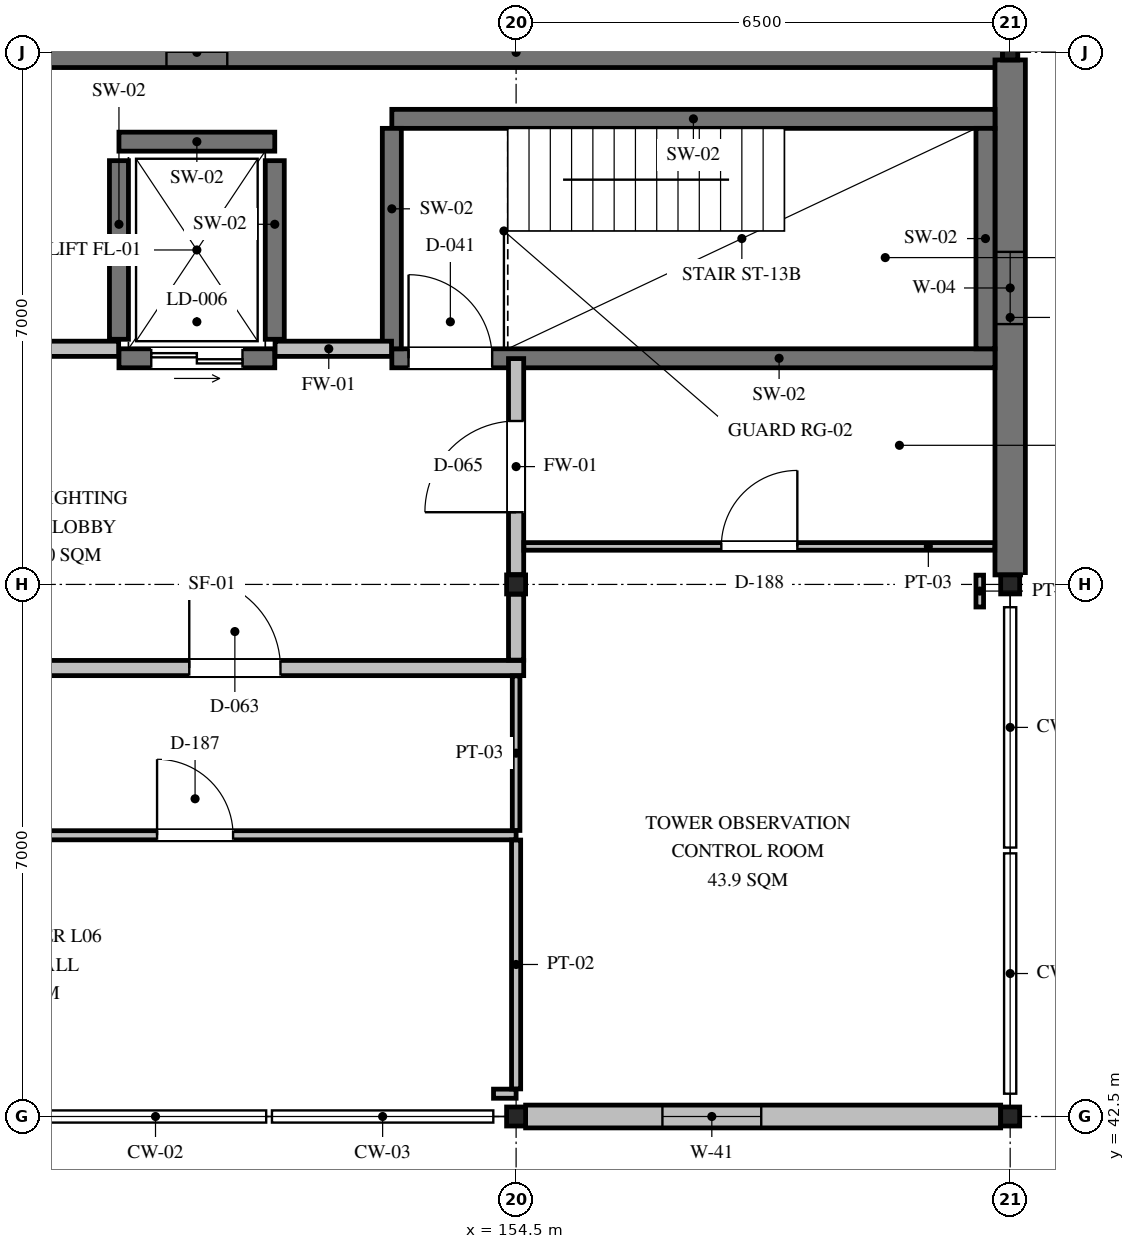
"""IFC4 building model, lengths in metres.
Left out: names, types, materials, properties, quantities, classifications, styles, units other than length and angle.
Written with IfcOpenShell. Run it as: python <this file> out.ifc"""

import sys

from ifc_helpers import new_model, si_unit, direction, frame, frame_2d, origin, origin_2d, place, context, subcontext, project, spatial, rectangle, i_section, extrude, element, fill, save


model = new_model("IFC4")
c1 = context("Model", 3, precision=1e-05, world=origin(), true_north=direction((0.0, 1.0)))
c2 = subcontext(c1, "Body", "Model", "MODEL_VIEW")
j1 = project(units=[si_unit("LENGTHUNIT", "METRE"), si_unit("PLANEANGLEUNIT", "RADIAN")], contexts=[c1])
p1 = place(None, origin())
s1 = spatial("IfcSite", under=j1, at=p1, CompositionType="ELEMENT")
p2 = place(p1, origin())
s2 = spatial("IfcBuilding", under=s1, at=p2, CompositionType="ELEMENT")
p3 = place(p2, frame((0.0, 0.0, 22.65)))
s3 = spatial("IfcBuildingStorey", under=s2, at=p3, CompositionType="ELEMENT", Elevation=22.65)
for number, where, z_axis, x_axis in (
    (1, (154.5, 42.5, 0.0), (0.0, 0.0, 1.0), (1.0, 0.0, 0.0)),
    (2, (154.5, 49.5, 0.0), (0.0, 0.0, 1.0), (1.0, 0.0, 0.0)),
    (3, (161.0, 42.5, 0.0), (0.0, 0.0, 1.0), (1.0, 0.0, 0.0)),
    (4, (161.0, 49.5, 0.0), (0.0, 0.0, 1.0), (1.0, 0.0, 0.0)),
):
    element("IfcColumn", number, at=place(p3, frame(where, z_axis=z_axis, x_axis=x_axis)), inside=s3, PredefinedType="COLUMN", context=c2, shape_type="SweptSolid", body=[
        extrude(i_section(OverallWidth=0.25, OverallDepth=0.25, WebThickness=0.009, FlangeThickness=0.014, FilletRadius=0.016, at=origin_2d()), origin(), (0.0, 0.0, 1.0), 4.2),
    ])
p4 = place(p3, frame((161.0, 56.5, 0.0), z_axis=(0.0, 0.0, 1.0), x_axis=(1.0, 0.0, 0.0)))
e5 = element("IfcColumn", 5, at=p4, inside=s3, PredefinedType="COLUMN", context=c2, shape_type="SweptSolid", body=[
    extrude(i_section(OverallWidth=0.2, OverallDepth=0.2, WebThickness=0.008, FlangeThickness=0.012, FilletRadius=0.013, at=origin_2d()), origin(), (0.0, 0.0, 1.0), 4.2),
])
p5 = place(p3, frame((148.1, 56.5, 0.0), z_axis=(0.0, 0.0, 1.0), x_axis=(1.0, 0.0, 0.0)))
e6 = element("IfcWall", 6, at=p5, inside=s3, PredefinedType="SHEAR", context=c2, shape_type="SweptSolid", body=[
    extrude(rectangle(XDim=12.8, YDim=0.4, at=frame_2d((6.4, 0.0))), origin(), (0.0, 0.0, 1.0), 3.98),
])
p6 = place(p5, frame((1.8, 0.0, 0.9)))
e7 = element("IfcOpeningElement", 7, at=p6, cuts=e6, PredefinedType="OPENING", context=c2, shape_type="SweptSolid", body=[
    extrude(rectangle(XDim=0.8, YDim=1.3, at=frame_2d((0.4, 0.65))), frame((0.0, 0.21, 0.0), z_axis=(0.0, -1.0, 0.0), x_axis=(1.0, 0.0, 0.0)), (0.0, 0.0, 1.0), 0.42),
])
p7 = place(p3, frame((161.0, 49.625, 0.0), z_axis=(0.0, 0.0, 1.0), x_axis=(0.0, 1.0, 0.0)))
e8 = element("IfcWall", 8, at=p7, inside=s3, PredefinedType="SHEAR", context=c2, shape_type="SweptSolid", body=[
    extrude(rectangle(XDim=6.775, YDim=0.4, at=frame_2d((3.387, 0.0))), origin(), (0.0, 0.0, 1.0), 3.98),
])
p8 = place(p7, frame((3.3, 0.0, 1.1)))
e9 = element("IfcOpeningElement", 9, at=p8, cuts=e8, PredefinedType="OPENING", context=c2, shape_type="SweptSolid", body=[
    extrude(rectangle(XDim=0.95, YDim=0.95, at=frame_2d((0.475, 0.475))), frame((0.0, 0.21, 0.0), z_axis=(0.0, -1.0, 0.0), x_axis=(1.0, 0.0, 0.0)), (0.0, 0.0, 1.0), 0.42),
])
p9 = place(p3, frame((154.625, 42.5, 0.0), z_axis=(0.0, 0.0, 1.0), x_axis=(1.0, 0.0, 0.0)))
e10 = element("IfcWall", 10, at=p9, inside=s3, PredefinedType="SOLIDWALL", context=c2, shape_type="SweptSolid", body=[
    extrude(rectangle(XDim=6.25, YDim=0.3, at=frame_2d((3.125, 0.0))), origin(), (0.0, 0.0, 1.0), 3.374),
])
p10 = place(p9, frame((1.8, 0.0, 0.9)))
e11 = element("IfcOpeningElement", 11, at=p10, cuts=e10, PredefinedType="OPENING", context=c2, shape_type="SweptSolid", body=[
    extrude(rectangle(XDim=1.3, YDim=1.3, at=frame_2d((0.65, 0.65))), frame((0.0, 0.16, 0.0), z_axis=(0.0, -1.0, 0.0), x_axis=(1.0, 0.0, 0.0)), (0.0, 0.0, 1.0), 0.32),
])
p11 = place(p3, frame((152.865, 52.475, 0.0), z_axis=(0.0, 0.0, 1.0), x_axis=(1.0, 0.0, 0.0)))
e12 = element("IfcWall", 12, at=p11, inside=s3, PredefinedType="SHEAR", context=c2, shape_type="SweptSolid", body=[
    extrude(rectangle(XDim=7.935, YDim=0.25, at=frame_2d((3.968, 0.0))), origin(), (0.0, 0.0, 1.0), 3.98),
])
p12 = place(p11, frame((0.22, 0.0, 0.0)))
e13 = element("IfcOpeningElement", 13, at=p12, cuts=e12, PredefinedType="OPENING", context=c2, shape_type="SweptSolid", body=[
    extrude(rectangle(XDim=1.1, YDim=2.15, at=frame_2d((0.55, 1.075))), frame((0.0, 0.135, 0.0), z_axis=(0.0, -1.0, 0.0), x_axis=(1.0, 0.0, 0.0)), (0.0, 0.0, 1.0), 0.27),
])
p13 = place(p3, frame((152.865, 55.625, 0.0), z_axis=(0.0, 0.0, 1.0), x_axis=(1.0, 0.0, 0.0)))
e14 = element("IfcWall", 14, at=p13, inside=s3, PredefinedType="SHEAR", context=c2, shape_type="SweptSolid", body=[
    extrude(rectangle(XDim=7.935, YDim=0.25, at=frame_2d((3.968, 0.0))), origin(), (0.0, 0.0, 1.0), 3.98),
])
for number, where, z_axis, x_axis in (
    (15, (152.865, 52.6, 0.0), (0.0, 0.0, 1.0), (0.0, 1.0, 0.0)),
    (16, (160.675, 52.6, 0.0), (0.0, 0.0, 1.0), (0.0, 1.0, 0.0)),
):
    element("IfcWall", number, at=place(p3, frame(where, z_axis=z_axis, x_axis=x_axis)), inside=s3, PredefinedType="SHEAR", context=c2, shape_type="SweptSolid", body=[
        extrude(rectangle(XDim=2.9, YDim=0.25, at=frame_2d((1.45, 0.0))), origin(), (0.0, 0.0, 1.0), 3.98),
    ])
p14 = place(p3, frame((149.275, 52.475, 0.0), z_axis=(0.0, 0.0, 1.0), x_axis=(1.0, 0.0, 0.0)))
e17 = element("IfcWall", 17, at=p14, inside=s3, PredefinedType="SHEAR", context=c2, shape_type="SweptSolid", body=[
    extrude(rectangle(XDim=2.05, YDim=0.25, at=frame_2d((1.025, 0.0))), origin(), (0.0, 0.0, 1.0), 3.98),
])
p15 = place(p14, frame((0.425, 0.0, 0.0)))
e18 = element("IfcOpeningElement", 18, at=p15, cuts=e17, PredefinedType="OPENING", context=c2, shape_type="SweptSolid", body=[
    extrude(rectangle(XDim=1.2, YDim=2.15, at=frame_2d((0.6, 1.075))), frame((0.0, 0.135, 0.0), z_axis=(0.0, -1.0, 0.0), x_axis=(1.0, 0.0, 0.0)), (0.0, 0.0, 1.0), 0.27),
])
p16 = place(p3, frame((149.275, 55.325, 0.0), z_axis=(0.0, 0.0, 1.0), x_axis=(1.0, 0.0, 0.0)))
e19 = element("IfcWall", 19, at=p16, inside=s3, PredefinedType="SHEAR", context=c2, shape_type="SweptSolid", body=[
    extrude(rectangle(XDim=2.05, YDim=0.25, at=frame_2d((1.025, 0.0))), origin(), (0.0, 0.0, 1.0), 3.98),
])
for number, where, z_axis, x_axis in (
    (20, (149.275, 52.725, 0.0), (0.0, 0.0, 1.0), (0.0, 1.0, 0.0)),
    (21, (151.325, 52.725, 0.0), (0.0, 0.0, 1.0), (0.0, 1.0, 0.0)),
):
    element("IfcWall", number, at=place(p3, frame(where, z_axis=z_axis, x_axis=x_axis)), inside=s3, PredefinedType="SHEAR", context=c2, shape_type="SweptSolid", body=[
        extrude(rectangle(XDim=2.35, YDim=0.25, at=frame_2d((1.175, 0.0))), origin(), (0.0, 0.0, 1.0), 3.98),
    ])
p17 = place(p3, frame((147.909, 52.6, 0.0), z_axis=(0.0, 0.0, 1.0), x_axis=(1.0, 0.0, 0.0)))
e22 = element("IfcWall", 22, at=p17, inside=s3, PredefinedType="PARTITIONING", context=c2, shape_type="SweptSolid", body=[
    extrude(rectangle(XDim=1.362, YDim=0.2, at=frame_2d((0.681, 0.0))), origin(), (0.0, 0.0, 1.0), 3.98),
])
p18 = place(p3, frame((151.329, 52.6, 0.0), z_axis=(0.0, 0.0, 1.0), x_axis=(1.0, 0.0, 0.0)))
e23 = element("IfcWall", 23, at=p18, inside=s3, PredefinedType="PARTITIONING", context=c2, shape_type="SweptSolid", body=[
    extrude(rectangle(XDim=1.532, YDim=0.2, at=frame_2d((0.766, 0.0))), origin(), (0.0, 0.0, 1.0), 3.98),
])
p19 = place(p3, frame((145.9, 48.4, 0.0), z_axis=(0.0, 0.0, 1.0), x_axis=(1.0, 0.0, 0.0)))
e24 = element("IfcWall", 24, at=p19, inside=s3, PredefinedType="PARTITIONING", context=c2, shape_type="SweptSolid", body=[
    extrude(rectangle(XDim=8.7, YDim=0.2, at=frame_2d((4.35, 0.0))), origin(), (0.0, 0.0, 1.0), 3.98),
])
p20 = place(p19, frame((4.3, 0.0, 0.0)))
e25 = element("IfcOpeningElement", 25, at=p20, cuts=e24, PredefinedType="OPENING", context=c2, shape_type="SweptSolid", body=[
    extrude(rectangle(XDim=1.2, YDim=2.15, at=frame_2d((0.6, 1.075))), frame((0.0, 0.11, 0.0), z_axis=(0.0, -1.0, 0.0), x_axis=(1.0, 0.0, 0.0)), (0.0, 0.0, 1.0), 0.22),
])
p21 = place(p3, frame((154.5, 48.504, 0.0), z_axis=(0.0, 0.0, 1.0), x_axis=(0.0, 1.0, 0.0)))
e26 = element("IfcWall", 26, at=p21, inside=s3, PredefinedType="PARTITIONING", context=c2, shape_type="SweptSolid", body=[
    extrude(rectangle(XDim=0.867, YDim=0.2, at=frame_2d((0.434, 0.0))), origin(), (0.0, 0.0, 1.0), 3.274),
])
p22 = place(p3, frame((154.5, 49.629, 0.0), z_axis=(0.0, 0.0, 1.0), x_axis=(0.0, 1.0, 0.0)))
e27 = element("IfcWall", 27, at=p22, inside=s3, PredefinedType="PARTITIONING", context=c2, shape_type="SweptSolid", body=[
    extrude(rectangle(XDim=2.842, YDim=0.2, at=frame_2d((1.421, 0.0))), origin(), (0.0, 0.0, 1.0), 3.98),
])
p23 = place(p22, frame((0.821, 0.0, 0.0)))
e28 = element("IfcOpeningElement", 28, at=p23, cuts=e27, PredefinedType="OPENING", context=c2, shape_type="SweptSolid", body=[
    extrude(rectangle(XDim=1.2, YDim=2.15, at=frame_2d((0.6, 1.075))), frame((0.0, 0.11, 0.0), z_axis=(0.0, -1.0, 0.0), x_axis=(1.0, 0.0, 0.0)), (0.0, 0.0, 1.0), 0.22),
])
p24 = place(p3, frame((154.203, 42.8, 0.0), z_axis=(0.0, 0.0, 1.0), x_axis=(1.0, 0.0, 0.0)))
e29 = element("IfcWall", 29, at=p24, inside=s3, PredefinedType="PARTITIONING", context=c2, shape_type="SweptSolid", body=[
    extrude(rectangle(XDim=0.297, YDim=0.12, at=frame_2d((0.148, 0.0))), origin(), (0.0, 0.0, 1.0), 3.98),
])
p25 = place(p3, frame((146.053, 46.2, 0.0), z_axis=(0.0, 0.0, 1.0), x_axis=(1.0, 0.0, 0.0)))
e30 = element("IfcWall", 30, at=p25, inside=s3, PredefinedType="PARTITIONING", context=c2, shape_type="SweptSolid", body=[
    extrude(rectangle(XDim=8.447, YDim=0.12, at=frame_2d((4.224, 0.0))), origin(), (0.0, 0.0, 1.0), 3.98),
])
p26 = place(p25, frame((3.723, 0.0, 0.0)))
e31 = element("IfcOpeningElement", 31, at=p26, cuts=e30, PredefinedType="OPENING", context=c2, shape_type="SweptSolid", body=[
    extrude(rectangle(XDim=1.0, YDim=2.1, at=frame_2d((0.5, 1.05))), frame((0.0, 0.07, 0.0), z_axis=(0.0, -1.0, 0.0), x_axis=(1.0, 0.0, 0.0)), (0.0, 0.0, 1.0), 0.14),
])
p27 = place(p3, frame((154.5, 42.863, 0.0), z_axis=(0.0, 0.0, 1.0), x_axis=(0.0, 1.0, 0.0)))
e32 = element("IfcWall", 32, at=p27, inside=s3, PredefinedType="PARTITIONING", context=c2, shape_type="SweptSolid", body=[
    extrude(rectangle(XDim=3.274, YDim=0.12, at=frame_2d((1.637, 0.0))), origin(), (0.0, 0.0, 1.0), 3.274),
])
p28 = place(p3, frame((154.603, 50.0, 0.0), z_axis=(0.0, 0.0, 1.0), x_axis=(1.0, 0.0, 0.0)))
e33 = element("IfcWall", 33, at=p28, inside=s3, PredefinedType="PARTITIONING", context=c2, shape_type="SweptSolid", body=[
    extrude(rectangle(XDim=6.194, YDim=0.1, at=frame_2d((3.097, 0.0))), origin(), (0.0, 0.0, 1.0), 3.98),
])
p29 = place(p28, frame((2.597, 0.0, 0.0)))
e34 = element("IfcOpeningElement", 34, at=p29, cuts=e33, PredefinedType="OPENING", context=c2, shape_type="SweptSolid", body=[
    extrude(rectangle(XDim=1.0, YDim=2.1, at=frame_2d((0.5, 1.05))), frame((0.0, 0.06, 0.0), z_axis=(0.0, -1.0, 0.0), x_axis=(1.0, 0.0, 0.0)), (0.0, 0.0, 1.0), 0.12),
])
p30 = place(p3, frame((154.5, 46.263, 0.0), z_axis=(0.0, 0.0, 1.0), x_axis=(0.0, 1.0, 0.0)))
e35 = element("IfcWall", 35, at=p30, inside=s3, PredefinedType="PARTITIONING", context=c2, shape_type="SweptSolid", body=[
    extrude(rectangle(XDim=2.034, YDim=0.1, at=frame_2d((1.017, 0.0))), origin(), (0.0, 0.0, 1.0), 3.274),
])
p31 = place(p3, frame((160.6, 49.203, 0.0), z_axis=(0.0, 0.0, 1.0), x_axis=(0.0, 1.0, 0.0)))
e36 = element("IfcWall", 36, at=p31, inside=s3, PredefinedType="PARTITIONING", context=c2, shape_type="SweptSolid", body=[
    extrude(rectangle(XDim=0.419, YDim=0.1, at=frame_2d((0.209, 0.0))), origin(), (0.0, 0.0, 1.0), 3.98),
])
p32 = place(p6, origin())
e37 = element("IfcWindow", 37, at=p32, inside=s3, PartitioningType="SINGLE_PANEL", PredefinedType="WINDOW", context=c2, shape_type="SweptSolid", body=[
    extrude(rectangle(XDim=0.8, YDim=1.3, at=frame_2d((0.4, 0.65))), frame((0.0, 0.03, 0.0), z_axis=(0.0, -1.0, 0.0), x_axis=(1.0, 0.0, 0.0)), (0.0, 0.0, 1.0), 0.06),
])
fill(e7, e37)
p33 = place(p8, origin())
e38 = element("IfcWindow", 38, at=p33, inside=s3, PartitioningType="SINGLE_PANEL", PredefinedType="WINDOW", context=c2, shape_type="SweptSolid", body=[
    extrude(rectangle(XDim=0.95, YDim=0.95, at=frame_2d((0.475, 0.475))), frame((0.0, 0.03, 0.0), z_axis=(0.0, -1.0, 0.0), x_axis=(1.0, 0.0, 0.0)), (0.0, 0.0, 1.0), 0.06),
])
fill(e9, e38)
p34 = place(p10, origin())
e39 = element("IfcWindow", 39, at=p34, inside=s3, PartitioningType="SINGLE_PANEL", PredefinedType="WINDOW", context=c2, shape_type="SweptSolid", body=[
    extrude(rectangle(XDim=1.3, YDim=1.3, at=frame_2d((0.65, 0.65))), frame((0.0, 0.03, 0.0), z_axis=(0.0, -1.0, 0.0), x_axis=(1.0, 0.0, 0.0)), (0.0, 0.0, 1.0), 0.06),
])
fill(e11, e39)
p35 = place(p12, frame((1.1, 0.0, 0.0), z_axis=(0.0, 0.0, 1.0), x_axis=(-1.0, 0.0, 0.0)))
e40 = element("IfcDoor", 40, at=p35, inside=s3, OperationType="SINGLE_SWING_LEFT", PredefinedType="DOOR", context=c2, shape_type="SweptSolid", body=[
    extrude(rectangle(XDim=1.1, YDim=2.15, at=frame_2d((0.55, 1.075))), frame((0.0, 0.025, 0.0), z_axis=(0.0, -1.0, 0.0), x_axis=(1.0, 0.0, 0.0)), (0.0, 0.0, 1.0), 0.05),
])
fill(e13, e40)
p36 = place(p15, origin())
e41 = element("IfcDoor", 41, at=p36, inside=s3, OperationType="DOUBLE_DOOR_SLIDING", PredefinedType="DOOR", context=c2, shape_type="SweptSolid", body=[
    extrude(rectangle(XDim=1.2, YDim=2.15, at=frame_2d((0.6, 1.075))), frame((0.0, 0.025, 0.0), z_axis=(0.0, -1.0, 0.0), x_axis=(1.0, 0.0, 0.0)), (0.0, 0.0, 1.0), 0.05),
])
fill(e18, e41)
p37 = place(p20, origin())
e42 = element("IfcDoor", 42, at=p37, inside=s3, OperationType="SINGLE_SWING_LEFT", PredefinedType="DOOR", context=c2, shape_type="SweptSolid", body=[
    extrude(rectangle(XDim=1.2, YDim=2.15, at=frame_2d((0.6, 1.075))), frame((0.0, 0.025, 0.0), z_axis=(0.0, -1.0, 0.0), x_axis=(1.0, 0.0, 0.0)), (0.0, 0.0, 1.0), 0.05),
])
fill(e25, e42)
p38 = place(p23, origin())
e43 = element("IfcDoor", 43, at=p38, inside=s3, OperationType="SINGLE_SWING_LEFT", PredefinedType="DOOR", context=c2, shape_type="SweptSolid", body=[
    extrude(rectangle(XDim=1.2, YDim=2.15, at=frame_2d((0.6, 1.075))), frame((0.0, 0.025, 0.0), z_axis=(0.0, -1.0, 0.0), x_axis=(1.0, 0.0, 0.0)), (0.0, 0.0, 1.0), 0.05),
])
fill(e28, e43)
p39 = place(p26, origin())
e44 = element("IfcDoor", 44, at=p39, inside=s3, OperationType="SINGLE_SWING_LEFT", PredefinedType="DOOR", context=c2, shape_type="SweptSolid", body=[
    extrude(rectangle(XDim=1.0, YDim=2.1, at=frame_2d((0.5, 1.05))), frame((0.0, 0.025, 0.0), z_axis=(0.0, -1.0, 0.0), x_axis=(1.0, 0.0, 0.0)), (0.0, 0.0, 1.0), 0.05),
])
fill(e31, e44)
p40 = place(p29, origin())
e45 = element("IfcDoor", 45, at=p40, inside=s3, OperationType="SINGLE_SWING_RIGHT", PredefinedType="DOOR", context=c2, shape_type="SweptSolid", body=[
    extrude(rectangle(XDim=1.0, YDim=2.1, at=frame_2d((0.5, 1.05))), frame((0.0, 0.025, 0.0), z_axis=(0.0, -1.0, 0.0), x_axis=(1.0, 0.0, 0.0)), (0.0, 0.0, 1.0), 0.05),
])
fill(e34, e45)
save(model, sys.argv[1])
